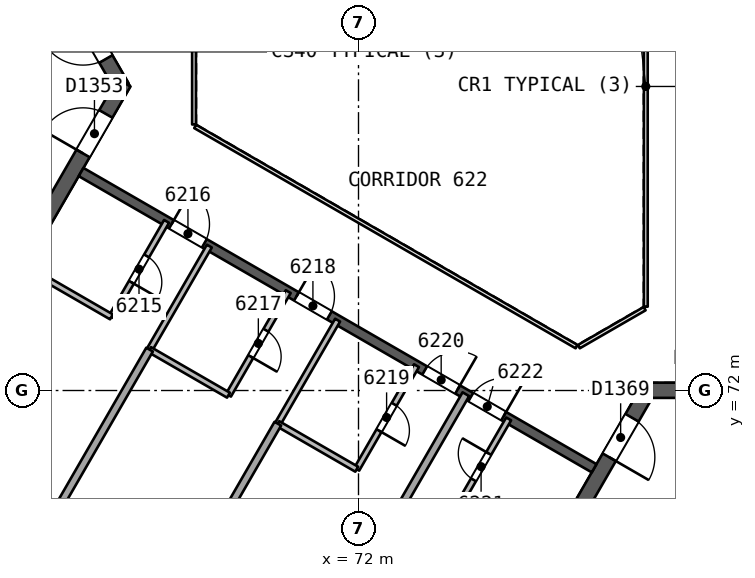
"""IFC4 building model, lengths in metres.
Left out: names, types, materials, properties, quantities, classifications, styles, units other than length and angle.
Written with IfcOpenShell. Run it as: python <this file> out.ifc"""

import sys

from ifc_helpers import new_model, si_unit, direction, frame, frame_2d, origin, place, context, subcontext, project, spatial, rectangle, extrude, element, fill, save


model = new_model("IFC4")
c1 = context("Model", 3, precision=1e-05, world=origin(), true_north=direction((0.0, 1.0)))
c2 = subcontext(c1, "Body", "Model", "MODEL_VIEW")
j1 = project(units=[si_unit("LENGTHUNIT", "METRE"), si_unit("PLANEANGLEUNIT", "RADIAN")], contexts=[c1])
p1 = place(None, origin())
s1 = spatial("IfcSite", under=j1, at=p1, CompositionType="ELEMENT")
p2 = place(p1, origin())
s2 = spatial("IfcBuilding", under=s1, at=p2, CompositionType="ELEMENT")
p3 = place(p2, frame((0.0, 0.0, 255.3)))
s3 = spatial("IfcBuildingStorey", under=s2, at=p3, CompositionType="ELEMENT", Elevation=255.3)
p4 = place(p3, frame((65.769, 80.0, 0.0), z_axis=(0.0, 0.0, 1.0), x_axis=(-0.50000177223, 0.866024380585, 0.0)))
e1 = element("IfcWall", 1, at=p4, inside=s3, PredefinedType="SHEAR", context=c2, shape_type="SweptSolid", body=[
    extrude(rectangle(XDim=10.265, YDim=0.4, at=frame_2d((5.132, 0.0))), origin(), (0.0, 0.0, 1.0), 3.7),
])
p5 = place(p4, frame((0.834, 0.0, 0.0)))
e2 = element("IfcOpeningElement", 2, at=p5, cuts=e1, PredefinedType="OPENING", context=c2, shape_type="SweptSolid", body=[
    extrude(rectangle(XDim=1.2, YDim=2.1, at=frame_2d((0.6, 1.05))), frame((0.0, 0.21, 0.0), z_axis=(0.0, -1.0, 0.0), x_axis=(1.0, 0.0, 0.0)), (0.0, 0.0, 1.0), 0.421),
])
p6 = place(p3, frame((60.737, 71.284, 0.0), z_axis=(0.0, 0.0, 1.0), x_axis=(0.50000547566, 0.866022242388, 0.0)))
e3 = element("IfcWall", 3, at=p6, inside=s3, PredefinedType="SHEAR", context=c2, shape_type="SweptSolid", body=[
    extrude(rectangle(XDim=10.18, YDim=0.4, at=frame_2d((5.09, 0.0))), origin(), (0.0, 0.0, 1.0), 3.7),
])
p7 = place(p6, frame((8.03, 0.0, 0.0)))
e4 = element("IfcOpeningElement", 4, at=p7, cuts=e3, PredefinedType="OPENING", context=c2, shape_type="SweptSolid", body=[
    extrude(rectangle(XDim=1.2, YDim=2.1, at=frame_2d((0.6, 1.05))), frame((0.0, 0.21, 0.0), z_axis=(0.0, -1.0, 0.0), x_axis=(1.0, 0.0, 0.0)), (0.0, 0.0, 1.0), 0.421),
])
p8 = place(p3, frame((79.615, 72.006, 0.0), z_axis=(0.0, 0.0, 1.0), x_axis=(-0.50000177223, -0.866024380585, 0.0)))
e5 = element("IfcWall", 5, at=p8, inside=s3, PredefinedType="SHEAR", context=c2, shape_type="SweptSolid", body=[
    extrude(rectangle(XDim=10.265, YDim=0.4, at=frame_2d((5.132, 0.0))), origin(), (0.0, 0.0, 1.0), 3.7),
])
p9 = place(p8, frame((0.834, 0.0, 0.0)))
e6 = element("IfcOpeningElement", 6, at=p9, cuts=e5, PredefinedType="OPENING", context=c2, shape_type="SweptSolid", body=[
    extrude(rectangle(XDim=1.2, YDim=2.1, at=frame_2d((0.6, 1.05))), frame((0.0, 0.21, 0.0), z_axis=(0.0, -1.0, 0.0), x_axis=(1.0, 0.0, 0.0)), (0.0, 0.0, 1.0), 0.421),
])
p10 = place(p3, frame((89.68, 72.006, 0.0), z_axis=(0.0, 0.0, 1.0), x_axis=(-1.0, 0.0, 0.0)))
e7 = element("IfcWall", 7, at=p10, inside=s3, PredefinedType="SHEAR", context=c2, shape_type="SweptSolid", body=[
    extrude(rectangle(XDim=10.18, YDim=0.4, at=frame_2d((5.09, 0.0))), origin(), (0.0, 0.0, 1.0), 3.7),
])
p11 = place(p10, frame((8.03, 0.0, 0.0)))
e8 = element("IfcOpeningElement", 8, at=p11, cuts=e7, PredefinedType="OPENING", context=c2, shape_type="SweptSolid", body=[
    extrude(rectangle(XDim=1.2, YDim=2.1, at=frame_2d((0.6, 1.05))), frame((0.0, 0.21, 0.0), z_axis=(0.0, -1.0, 0.0), x_axis=(1.0, 0.0, 0.0)), (0.0, 0.0, 1.0), 0.421),
])
p12 = place(p3, frame((64.7, 77.748, 0.0), z_axis=(0.0, 0.0, 1.0), x_axis=(0.866026492143, -0.499998114903, 0.0)))
e9 = element("IfcWall", 9, at=p12, inside=s3, PredefinedType="SHEAR", context=c2, shape_type="SweptSolid", body=[
    extrude(rectangle(XDim=15.588, YDim=0.25, at=frame_2d((7.794, 0.0))), origin(), (0.0, 0.0, 1.0), 3.3),
])
p13 = place(p12, frame((2.747, 0.0, 0.0)))
e10 = element("IfcOpeningElement", 10, at=p13, cuts=e9, PredefinedType="OPENING", context=c2, shape_type="SweptSolid", body=[
    extrude(rectangle(XDim=1.0, YDim=2.1, at=frame_2d((0.5, 1.05))), frame((0.0, 0.135, 0.0), z_axis=(0.0, -1.0, 0.0), x_axis=(1.0, 0.0, 0.0)), (0.0, 0.0, 1.0), 0.271),
])
p14 = place(p12, frame((6.544, 0.0, 0.0)))
e11 = element("IfcOpeningElement", 11, at=p14, cuts=e9, PredefinedType="OPENING", context=c2, shape_type="SweptSolid", body=[
    extrude(rectangle(XDim=1.0, YDim=2.1, at=frame_2d((0.5, 1.05))), frame((0.0, 0.135, 0.0), z_axis=(0.0, -1.0, 0.0), x_axis=(1.0, 0.0, 0.0)), (0.0, 0.0, 1.0), 0.271),
])
p15 = place(p12, frame((10.441, 0.0, 0.0)))
e12 = element("IfcOpeningElement", 12, at=p15, cuts=e9, PredefinedType="OPENING", context=c2, shape_type="SweptSolid", body=[
    extrude(rectangle(XDim=1.0, YDim=2.1, at=frame_2d((0.5, 1.05))), frame((0.0, 0.135, 0.0), z_axis=(0.0, -1.0, 0.0), x_axis=(1.0, 0.0, 0.0)), (0.0, 0.0, 1.0), 0.271),
])
p16 = place(p12, frame((11.841, 0.0, 0.0)))
e13 = element("IfcOpeningElement", 13, at=p16, cuts=e9, PredefinedType="OPENING", context=c2, shape_type="SweptSolid", body=[
    extrude(rectangle(XDim=1.0, YDim=2.1, at=frame_2d((0.5, 1.05))), frame((0.0, 0.135, 0.0), z_axis=(0.0, -1.0, 0.0), x_axis=(1.0, 0.0, 0.0)), (0.0, 0.0, 1.0), 0.271),
])
p17 = place(p3, frame((66.949, 76.45, 0.0), z_axis=(0.0, 0.0, 1.0), x_axis=(-0.499987231761, -0.866032775405, 0.0)))
e14 = element("IfcWall", 14, at=p17, inside=s3, PredefinedType="PARTITIONING", context=c2, shape_type="SweptSolid", body=[
    extrude(rectangle(XDim=2.9, YDim=0.15, at=frame_2d((1.45, 0.0))), origin(), (0.0, 0.0, 1.0), 3.3),
])
p18 = place(p17, frame((1.05, 0.0, 0.0)))
e15 = element("IfcOpeningElement", 15, at=p18, cuts=e14, PredefinedType="OPENING", context=c2, shape_type="SweptSolid", body=[
    extrude(rectangle(XDim=0.8, YDim=2.1, at=frame_2d((0.4, 1.05))), frame((0.0, 0.085, 0.0), z_axis=(0.0, -1.0, 0.0), x_axis=(1.0, 0.0, 0.0)), (0.0, 0.0, 1.0), 0.171),
])
p19 = place(p3, frame((65.499, 73.938, 0.0), z_axis=(0.0, 0.0, 1.0), x_axis=(-0.866004188936, 0.500036743394, 0.0)))
e16 = element("IfcWall", 16, at=p19, inside=s3, PredefinedType="PARTITIONING", context=c2, shape_type="SweptSolid", body=[
    extrude(rectangle(XDim=2.398, YDim=0.15, at=frame_2d((1.199, 0.0))), origin(), (0.0, 0.0, 1.0), 3.3),
])
p20 = place(p3, frame((63.224, 67.397, 0.0), z_axis=(0.0, 0.0, 1.0), x_axis=(0.499983526171, 0.866034914745, 0.0)))
e17 = element("IfcWall", 17, at=p20, inside=s3, PredefinedType="PARTITIONING", context=c2, shape_type="SweptSolid", body=[
    extrude(rectangle(XDim=6.557, YDim=0.2, at=frame_2d((3.278, 0.0))), origin(), (0.0, 0.0, 1.0), 3.3),
])
p21 = place(p3, frame((66.502, 73.076, 0.0), z_axis=(0.0, 0.0, 1.0), x_axis=(0.499995674689, 0.86602790099, 0.0)))
e18 = element("IfcWall", 18, at=p21, inside=s3, PredefinedType="PARTITIONING", context=c2, shape_type="SweptSolid", body=[
    extrude(rectangle(XDim=3.146, YDim=0.15, at=frame_2d((1.573, 0.0))), origin(), (0.0, 0.0, 1.0), 3.3),
])
p22 = place(p3, frame((70.151, 74.601, 0.0), z_axis=(0.0, 0.0, 1.0), x_axis=(-0.499995674689, -0.86602790099, 0.0)))
e19 = element("IfcWall", 19, at=p22, inside=s3, PredefinedType="PARTITIONING", context=c2, shape_type="SweptSolid", body=[
    extrude(rectangle(XDim=3.146, YDim=0.15, at=frame_2d((1.573, 0.0))), origin(), (0.0, 0.0, 1.0), 3.3),
])
p23 = place(p22, frame((1.173, 0.0, 0.0)))
e20 = element("IfcOpeningElement", 20, at=p23, cuts=e19, PredefinedType="OPENING", context=c2, shape_type="SweptSolid", body=[
    extrude(rectangle(XDim=0.8, YDim=2.1, at=frame_2d((0.4, 1.05))), frame((0.0, 0.085, 0.0), z_axis=(0.0, -1.0, 0.0), x_axis=(1.0, 0.0, 0.0)), (0.0, 0.0, 1.0), 0.171),
])
p24 = place(p3, frame((68.578, 71.877, 0.0), z_axis=(0.0, 0.0, 1.0), x_axis=(-0.866034636017, 0.499984008963, 0.0)))
e21 = element("IfcWall", 21, at=p24, inside=s3, PredefinedType="PARTITIONING", context=c2, shape_type="SweptSolid", body=[
    extrude(rectangle(XDim=2.397, YDim=0.15, at=frame_2d((1.198, 0.0))), origin(), (0.0, 0.0, 1.0), 3.3),
])
p25 = place(p3, frame((66.599, 65.449, 0.0), z_axis=(0.0, 0.0, 1.0), x_axis=(0.499983526171, 0.866034914745, 0.0)))
e22 = element("IfcWall", 22, at=p25, inside=s3, PredefinedType="PARTITIONING", context=c2, shape_type="SweptSolid", body=[
    extrude(rectangle(XDim=6.557, YDim=0.2, at=frame_2d((3.278, 0.0))), origin(), (0.0, 0.0, 1.0), 3.3),
])
p26 = place(p3, frame((69.877, 71.127, 0.0), z_axis=(0.0, 0.0, 1.0), x_axis=(0.499995674689, 0.86602790099, 0.0)))
e23 = element("IfcWall", 23, at=p26, inside=s3, PredefinedType="PARTITIONING", context=c2, shape_type="SweptSolid", body=[
    extrude(rectangle(XDim=3.146, YDim=0.15, at=frame_2d((1.573, 0.0))), origin(), (0.0, 0.0, 1.0), 3.3),
])
p27 = place(p3, frame((73.526, 72.653, 0.0), z_axis=(0.0, 0.0, 1.0), x_axis=(-0.500029284648, -0.866008495625, 0.0)))
e24 = element("IfcWall", 24, at=p27, inside=s3, PredefinedType="PARTITIONING", context=c2, shape_type="SweptSolid", body=[
    extrude(rectangle(XDim=3.145, YDim=0.15, at=frame_2d((1.573, 0.0))), origin(), (0.0, 0.0, 1.0), 3.3),
])
p28 = place(p27, frame((1.173, 0.0, 0.0)))
e25 = element("IfcOpeningElement", 25, at=p28, cuts=e24, PredefinedType="OPENING", context=c2, shape_type="SweptSolid", body=[
    extrude(rectangle(XDim=0.8, YDim=2.1, at=frame_2d((0.4, 1.05))), frame((0.0, 0.085, 0.0), z_axis=(0.0, -1.0, 0.0), x_axis=(1.0, 0.0, 0.0)), (0.0, 0.0, 1.0), 0.171),
])
p29 = place(p3, frame((71.953, 69.929, 0.0), z_axis=(0.0, 0.0, 1.0), x_axis=(-0.866034636017, 0.499984008963, 0.0)))
e26 = element("IfcWall", 26, at=p29, inside=s3, PredefinedType="PARTITIONING", context=c2, shape_type="SweptSolid", body=[
    extrude(rectangle(XDim=2.397, YDim=0.15, at=frame_2d((1.198, 0.0))), origin(), (0.0, 0.0, 1.0), 3.3),
])
p30 = place(p3, frame((69.974, 63.5, 0.0), z_axis=(0.0, 0.0, 1.0), x_axis=(0.499987464755, 0.86603264089, 0.0)))
e27 = element("IfcWall", 27, at=p30, inside=s3, PredefinedType="PARTITIONING", context=c2, shape_type="SweptSolid", body=[
    extrude(rectangle(XDim=9.702, YDim=0.2, at=frame_2d((4.851, 0.0))), origin(), (0.0, 0.0, 1.0), 3.3),
])
p31 = place(p3, frame((74.501, 68.741, 0.0), z_axis=(0.0, 0.0, 1.0), x_axis=(0.50005036918, 0.865996321171, 0.0)))
e28 = element("IfcWall", 28, at=p31, inside=s3, PredefinedType="PARTITIONING", context=c2, shape_type="SweptSolid", body=[
    extrude(rectangle(XDim=2.9, YDim=0.15, at=frame_2d((1.45, 0.0))), origin(), (0.0, 0.0, 1.0), 3.3),
])
p32 = place(p31, frame((1.05, 0.0, 0.0)))
e29 = element("IfcOpeningElement", 29, at=p32, cuts=e28, PredefinedType="OPENING", context=c2, shape_type="SweptSolid", body=[
    extrude(rectangle(XDim=0.8, YDim=2.1, at=frame_2d((0.4, 1.05))), frame((0.0, 0.085, 0.0), z_axis=(0.0, -1.0, 0.0), x_axis=(1.0, 0.0, 0.0)), (0.0, 0.0, 1.0), 0.171),
])
p33 = place(p3, frame((87.633, 53.133, 0.0), z_axis=(0.0, 0.0, 1.0), x_axis=(-0.866025373204, 0.500000052967, 0.0)))
e30 = element("IfcWall", 30, at=p33, inside=s3, PredefinedType="SOLIDWALL", context=c2, shape_type="SweptSolid", body=[
    extrude(rectangle(XDim=48.748, YDim=0.3, at=frame_2d((24.374, 0.0))), origin(), (0.0, 0.0, 1.0), 3.3),
])
p34 = place(p33, frame((37.353, 0.0, 0.0)))
e31 = element("IfcOpeningElement", 31, at=p34, cuts=e30, PredefinedType="OPENING", context=c2, shape_type="SweptSolid", body=[
    extrude(rectangle(XDim=2.4, YDim=2.4, at=frame_2d((1.2, 1.2))), frame((0.0, 0.161, 0.0), z_axis=(0.0, -1.0, 0.0), x_axis=(1.0, 0.0, 0.0)), (0.0, 0.0, 1.0), 0.321),
])
p35 = place(p33, frame((8.995, 0.0, 0.0)))
e32 = element("IfcOpeningElement", 32, at=p35, cuts=e30, PredefinedType="OPENING", context=c2, shape_type="SweptSolid", body=[
    extrude(rectangle(XDim=2.4, YDim=2.4, at=frame_2d((1.2, 1.2))), frame((0.0, 0.161, 0.0), z_axis=(0.0, -1.0, 0.0), x_axis=(1.0, 0.0, 0.0)), (0.0, 0.0, 1.0), 0.321),
])
p36 = place(p33, frame((25.123, 0.0, 0.0)))
e33 = element("IfcOpeningElement", 33, at=p36, cuts=e30, PredefinedType="OPENING", context=c2, shape_type="SweptSolid", body=[
    extrude(rectangle(XDim=2.4, YDim=2.4, at=frame_2d((1.2, 1.2))), frame((0.0, 0.161, 0.0), z_axis=(0.0, -1.0, 0.0), x_axis=(1.0, 0.0, 0.0)), (0.0, 0.0, 1.0), 0.321),
])
p37 = place(p33, frame((21.226, 0.0, 0.0)))
e34 = element("IfcOpeningElement", 34, at=p37, cuts=e30, PredefinedType="OPENING", context=c2, shape_type="SweptSolid", body=[
    extrude(rectangle(XDim=2.4, YDim=2.4, at=frame_2d((1.2, 1.2))), frame((0.0, 0.161, 0.0), z_axis=(0.0, -1.0, 0.0), x_axis=(1.0, 0.0, 0.0)), (0.0, 0.0, 1.0), 0.321),
])
p38 = place(p3, frame((77.135, 64.952, 0.0), z_axis=(0.0, 0.0, 1.0), x_axis=(0.866031916153, 0.499988720078, 0.0)))
e35 = element("IfcWall", 35, at=p38, inside=s3, PredefinedType="SOLIDWALL", context=c2, shape_type="SweptSolid", body=[
    extrude(rectangle(XDim=11.35, YDim=0.2, at=frame_2d((5.675, 0.0))), origin(), (0.0, 0.0, 1.0), 3.3),
])
p39 = place(p38, frame((2.875, 0.0, 0.0)))
e36 = element("IfcOpeningElement", 36, at=p39, cuts=e35, PredefinedType="OPENING", context=c2, shape_type="SweptSolid", body=[
    extrude(rectangle(XDim=1.1, YDim=2.1, at=frame_2d((0.55, 1.05))), frame((0.0, 0.11, 0.0), z_axis=(0.0, -1.0, 0.0), x_axis=(1.0, 0.0, 0.0)), (0.0, 0.0, 1.0), 0.221),
])
p40 = place(p38, frame((5.125, 0.0, 0.0)))
e37 = element("IfcOpeningElement", 37, at=p40, cuts=e35, PredefinedType="OPENING", context=c2, shape_type="SweptSolid", body=[
    extrude(rectangle(XDim=1.1, YDim=2.1, at=frame_2d((0.55, 1.05))), frame((0.0, 0.11, 0.0), z_axis=(0.0, -1.0, 0.0), x_axis=(1.0, 0.0, 0.0)), (0.0, 0.0, 1.0), 0.221),
])
p41 = place(p38, frame((7.375, 0.0, 0.0)))
e38 = element("IfcOpeningElement", 38, at=p41, cuts=e35, PredefinedType="OPENING", context=c2, shape_type="SweptSolid", body=[
    extrude(rectangle(XDim=1.1, YDim=2.1, at=frame_2d((0.55, 1.05))), frame((0.0, 0.11, 0.0), z_axis=(0.0, -1.0, 0.0), x_axis=(1.0, 0.0, 0.0)), (0.0, 0.0, 1.0), 0.221),
])
p42 = place(p3, frame((79.56, 74.206, 0.0), z_axis=(0.0, 0.0, 1.0), x_axis=(0.0, 1.0, 0.0)))
e39 = element("IfcWall", 39, at=p42, inside=s3, PredefinedType="PARTITIONING", context=c2, shape_type="SweptSolid", body=[
    extrude(rectangle(XDim=11.588, YDim=0.1, at=frame_2d((5.794, 0.0))), origin(), (0.0, 0.0, 1.0), 3.3),
])
p43 = place(p3, frame((67.672, 81.0, 0.0), z_axis=(0.0, 0.0, 1.0), x_axis=(0.0, -1.0, 0.0)))
e40 = element("IfcWall", 40, at=p43, inside=s3, PredefinedType="PARTITIONING", context=c2, shape_type="SweptSolid", body=[
    extrude(rectangle(XDim=2.0, YDim=0.1, at=frame_2d((1.0, 0.0))), origin(), (0.0, 0.0, 1.0), 3.3),
])
p44 = place(p3, frame((67.702, 78.948, 0.0), z_axis=(0.0, 0.0, 1.0), x_axis=(0.866026658274, -0.499997827154, 0.0)))
e41 = element("IfcWall", 41, at=p44, inside=s3, PredefinedType="PARTITIONING", context=c2, shape_type="SweptSolid", body=[
    extrude(rectangle(XDim=11.588, YDim=0.1, at=frame_2d((5.794, 0.0))), origin(), (0.0, 0.0, 1.0), 3.3),
])
p45 = place(p3, frame((77.798, 73.154, 0.0), z_axis=(0.0, 0.0, 1.0), x_axis=(0.866041268327, 0.499972520799, 0.0)))
e42 = element("IfcWall", 42, at=p45, inside=s3, PredefinedType="PARTITIONING", context=c2, shape_type="SweptSolid", body=[
    extrude(rectangle(XDim=2.0, YDim=0.1, at=frame_2d((1.0, 0.0))), origin(), (0.0, 0.0, 1.0), 3.3),
])
p46 = place(p18, origin())
e43 = element("IfcDoor", 43, at=p46, inside=s3, OperationType="SINGLE_SWING_RIGHT", PredefinedType="NOTDEFINED", context=c2, shape_type="SweptSolid", body=[
    extrude(rectangle(XDim=0.8, YDim=2.1, at=frame_2d((0.4, 1.05))), frame((0.0, 0.025, 0.0), z_axis=(0.0, -1.0, 0.0), x_axis=(1.0, 0.0, 0.0)), (0.0, 0.0, 1.0), 0.05),
])
fill(e15, e43)
p47 = place(p13, origin())
e44 = element("IfcDoor", 44, at=p47, inside=s3, OperationType="SINGLE_SWING_LEFT", PredefinedType="NOTDEFINED", context=c2, shape_type="SweptSolid", body=[
    extrude(rectangle(XDim=1.0, YDim=2.1, at=frame_2d((0.5, 1.05))), frame((0.0, 0.025, 0.0), z_axis=(0.0, -1.0, 0.0), x_axis=(1.0, 0.0, 0.0)), (0.0, 0.0, 1.0), 0.05),
])
fill(e10, e44)
p48 = place(p23, origin())
e45 = element("IfcDoor", 45, at=p48, inside=s3, OperationType="SINGLE_SWING_RIGHT", PredefinedType="NOTDEFINED", context=c2, shape_type="SweptSolid", body=[
    extrude(rectangle(XDim=0.8, YDim=2.1, at=frame_2d((0.4, 1.05))), frame((0.0, 0.025, 0.0), z_axis=(0.0, -1.0, 0.0), x_axis=(1.0, 0.0, 0.0)), (0.0, 0.0, 1.0), 0.05),
])
fill(e20, e45)
p49 = place(p14, origin())
e46 = element("IfcDoor", 46, at=p49, inside=s3, OperationType="SINGLE_SWING_LEFT", PredefinedType="NOTDEFINED", context=c2, shape_type="SweptSolid", body=[
    extrude(rectangle(XDim=1.0, YDim=2.1, at=frame_2d((0.5, 1.05))), frame((0.0, 0.025, 0.0), z_axis=(0.0, -1.0, 0.0), x_axis=(1.0, 0.0, 0.0)), (0.0, 0.0, 1.0), 0.05),
])
fill(e11, e46)
p50 = place(p28, origin())
e47 = element("IfcDoor", 47, at=p50, inside=s3, OperationType="SINGLE_SWING_RIGHT", PredefinedType="NOTDEFINED", context=c2, shape_type="SweptSolid", body=[
    extrude(rectangle(XDim=0.8, YDim=2.1, at=frame_2d((0.4, 1.05))), frame((0.0, 0.025, 0.0), z_axis=(0.0, -1.0, 0.0), x_axis=(1.0, 0.0, 0.0)), (0.0, 0.0, 1.0), 0.05),
])
fill(e25, e47)
p51 = place(p15, origin())
e48 = element("IfcDoor", 48, at=p51, inside=s3, OperationType="SINGLE_SWING_RIGHT", PredefinedType="NOTDEFINED", context=c2, shape_type="SweptSolid", body=[
    extrude(rectangle(XDim=1.0, YDim=2.1, at=frame_2d((0.5, 1.05))), frame((0.0, 0.025, 0.0), z_axis=(0.0, -1.0, 0.0), x_axis=(1.0, 0.0, 0.0)), (0.0, 0.0, 1.0), 0.05),
])
fill(e12, e48)
p52 = place(p32, origin())
e49 = element("IfcDoor", 49, at=p52, inside=s3, OperationType="SINGLE_SWING_RIGHT", PredefinedType="NOTDEFINED", context=c2, shape_type="SweptSolid", body=[
    extrude(rectangle(XDim=0.8, YDim=2.1, at=frame_2d((0.4, 1.05))), frame((0.0, 0.025, 0.0), z_axis=(0.0, -1.0, 0.0), x_axis=(1.0, 0.0, 0.0)), (0.0, 0.0, 1.0), 0.05),
])
fill(e29, e49)
p53 = place(p16, origin())
e50 = element("IfcDoor", 50, at=p53, inside=s3, OperationType="SINGLE_SWING_RIGHT", PredefinedType="NOTDEFINED", context=c2, shape_type="SweptSolid", body=[
    extrude(rectangle(XDim=1.0, YDim=2.1, at=frame_2d((0.5, 1.05))), frame((0.0, 0.025, 0.0), z_axis=(0.0, -1.0, 0.0), x_axis=(1.0, 0.0, 0.0)), (0.0, 0.0, 1.0), 0.05),
])
fill(e13, e50)
p54 = place(p5, origin())
e51 = element("IfcDoor", 51, at=p54, inside=s3, OperationType="SINGLE_SWING_RIGHT", PredefinedType="NOTDEFINED", context=c2, shape_type="SweptSolid", body=[
    extrude(rectangle(XDim=1.2, YDim=2.1, at=frame_2d((0.6, 1.05))), frame((0.0, 0.025, 0.0), z_axis=(0.0, -1.0, 0.0), x_axis=(1.0, 0.0, 0.0)), (0.0, 0.0, 1.0), 0.05),
])
fill(e2, e51)
p55 = place(p7, origin())
e52 = element("IfcDoor", 52, at=p55, inside=s3, OperationType="SINGLE_SWING_LEFT", PredefinedType="NOTDEFINED", context=c2, shape_type="SweptSolid", body=[
    extrude(rectangle(XDim=1.2, YDim=2.1, at=frame_2d((0.6, 1.05))), frame((0.0, 0.025, 0.0), z_axis=(0.0, -1.0, 0.0), x_axis=(1.0, 0.0, 0.0)), (0.0, 0.0, 1.0), 0.05),
])
fill(e4, e52)
p56 = place(p9, origin())
e53 = element("IfcDoor", 53, at=p56, inside=s3, OperationType="SINGLE_SWING_RIGHT", PredefinedType="NOTDEFINED", context=c2, shape_type="SweptSolid", body=[
    extrude(rectangle(XDim=1.2, YDim=2.1, at=frame_2d((0.6, 1.05))), frame((0.0, 0.025, 0.0), z_axis=(0.0, -1.0, 0.0), x_axis=(1.0, 0.0, 0.0)), (0.0, 0.0, 1.0), 0.05),
])
fill(e6, e53)
save(model, sys.argv[1])
